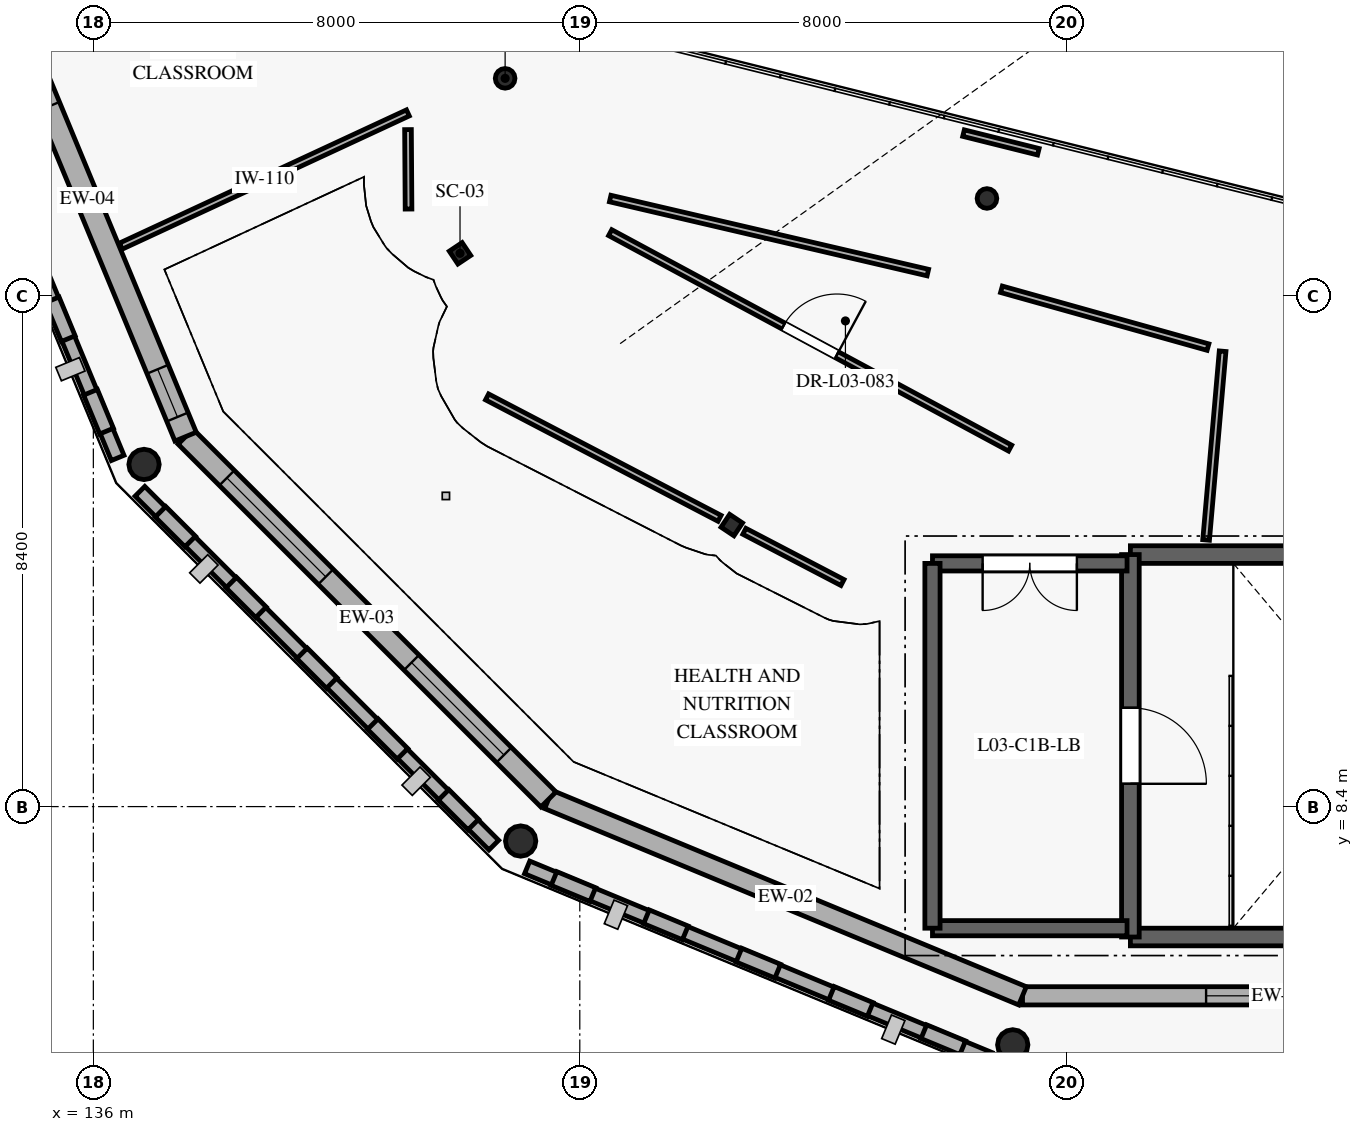
"""IFC4 building model, lengths in metres.
Left out: names, types, materials, properties, quantities, classifications, styles, units other than length and angle.
Written with IfcOpenShell. Run it as: python <this file> out.ifc"""

import sys

from ifc_helpers import new_model, si_unit, direction, frame, frame_2d, origin, origin_2d, place, context, subcontext, project, spatial, rectangle, circle, hollow_circle, i_section, extrude, element, fill, save


model = new_model("IFC4")
c1 = context("Model", 3, precision=1e-05, world=origin(), true_north=direction((0.0, 1.0)))
c2 = subcontext(c1, "Body", "Model", "MODEL_VIEW")
j1 = project(units=[si_unit("LENGTHUNIT", "METRE"), si_unit("PLANEANGLEUNIT", "RADIAN")], contexts=[c1])
p1 = place(None, origin())
s1 = spatial("IfcSite", under=j1, at=p1, CompositionType="ELEMENT")
p2 = place(p1, origin())
s2 = spatial("IfcBuilding", under=s1, at=p2, CompositionType="ELEMENT")
p3 = place(p2, frame((0.0, 0.0, 12.6)))
s3 = spatial("IfcBuildingStorey", under=s2, at=p3, CompositionType="ELEMENT", Elevation=12.6)
for number, where, z_axis, x_axis in (
    (1, (142.772, 20.377, 0.0), (0.0, 0.0, 1.0), (0.97, -0.242, 0.0)),
    (2, (150.696, 18.402, 0.0), (0.0, 0.0, 1.0), (0.97, -0.242, 0.0)),
):
    element("IfcColumn", number, at=place(p3, frame(where, z_axis=z_axis, x_axis=x_axis)), inside=s3, PredefinedType="COLUMN", context=c2, shape_type="SweptSolid", body=[
        extrude(hollow_circle(Radius=0.162, WallThickness=0.016, at=origin_2d()), origin(), (0.0, 0.0, 1.0), 4.2),
    ])
for number, where, z_axis, x_axis in (
    (3, (136.833, 14.027, 0.0), (0.0, 0.0, 1.0), (0.556, -0.831, 0.0)),
    (4, (143.027, 7.833, 0.0), (0.0, 0.0, 1.0), (0.831, -0.556, 0.0)),
    (5, (151.12, 4.481, 0.0), (0.0, 0.0, 1.0), (0.981, -0.195, 0.0)),
):
    element("IfcColumn", number, at=place(p3, frame(where, z_axis=z_axis, x_axis=x_axis)), inside=s3, PredefinedType="COLUMN", context=c2, shape_type="SweptSolid", body=[
        extrude(circle(Radius=0.25, at=origin_2d()), origin(), (0.0, 0.0, 1.0), 4.2),
    ])
for number, where, z_axis, x_axis in (
    (6, (142.03, 17.5, 0.0), (0.0, 0.0, 1.0), (0.556, -0.831, 0.0)),
    (7, (146.5, 13.03, 0.0), (0.0, 0.0, 1.0), (0.831, -0.556, 0.0)),
):
    element("IfcColumn", number, at=place(p3, frame(where, z_axis=z_axis, x_axis=x_axis)), inside=s3, PredefinedType="COLUMN", context=c2, shape_type="SweptSolid", body=[
        extrude(i_section(OverallWidth=0.255, OverallDepth=0.254, WebThickness=0.009, FlangeThickness=0.014, FilletRadius=0.013, at=origin_2d()), origin(), (0.0, 0.0, 1.0), 4.2),
    ])
p4 = place(p3, frame((159.719, 5.288, 0.0), z_axis=(0.0, 0.0, 1.0), x_axis=(-1.0, 0.0, 0.0)))
e8 = element("IfcWall", 8, at=p4, inside=s3, PredefinedType="SOLIDWALL", context=c2, shape_type="SweptSolid", body=[
    extrude(rectangle(XDim=8.438, YDim=0.3, at=frame_2d((4.219, 0.0))), origin(), (0.0, 0.0, 1.0), 3.94),
])
p5 = place(p4, frame((1.185, 0.0, 0.85)))
e9 = element("IfcOpeningElement", 9, at=p5, cuts=e8, PredefinedType="OPENING", context=c2, shape_type="SweptSolid", body=[
    extrude(rectangle(XDim=1.85, YDim=1.4, at=frame_2d((0.925, 0.7))), frame((0.0, 0.16, 0.0), z_axis=(0.0, -1.0, 0.0), x_axis=(1.0, 0.0, 0.0)), (0.0, 0.0, 1.0), 0.32),
])
p6 = place(p4, frame((4.569, 0.0, 0.85)))
e10 = element("IfcOpeningElement", 10, at=p6, cuts=e8, PredefinedType="OPENING", context=c2, shape_type="SweptSolid", body=[
    extrude(rectangle(XDim=0.85, YDim=1.4, at=frame_2d((0.425, 0.7))), frame((0.0, 0.16, 0.0), z_axis=(0.0, -1.0, 0.0), x_axis=(1.0, 0.0, 0.0)), (0.0, 0.0, 1.0), 0.32),
])
p7 = place(p3, frame((151.281, 5.288, 0.0), z_axis=(0.0, 0.0, 1.0), x_axis=(-0.923884604839, 0.382671186453, 0.0)))
e11 = element("IfcWall", 11, at=p7, inside=s3, PredefinedType="SOLIDWALL", context=c2, shape_type="SweptSolid", body=[
    extrude(rectangle(XDim=8.439, YDim=0.325, at=frame_2d((4.219, 0.0))), origin(), (0.0, 0.0, 1.0), 3.94),
])
p8 = place(p3, frame((143.484, 8.517, 0.0), z_axis=(0.0, 0.0, 1.0), x_axis=(-0.707106781187, 0.707106781187, 0.0)))
e12 = element("IfcWall", 12, at=p8, inside=s3, PredefinedType="SOLIDWALL", context=c2, shape_type="SweptSolid", body=[
    extrude(rectangle(XDim=8.439, YDim=0.35, at=frame_2d((4.219, 0.0))), origin(), (0.0, 0.0, 1.0), 3.94),
])
p9 = place(p8, frame((1.035, 0.0, 0.85)))
e13 = element("IfcOpeningElement", 13, at=p9, cuts=e12, PredefinedType="OPENING", context=c2, shape_type="SweptSolid", body=[
    extrude(rectangle(XDim=2.15, YDim=1.4, at=frame_2d((1.075, 0.7))), frame((0.0, 0.185, 0.0), z_axis=(0.0, -1.0, 0.0), x_axis=(1.0, 0.0, 0.0)), (0.0, 0.0, 1.0), 0.37),
])
p10 = place(p8, frame((5.179, 0.0, 0.85)))
e14 = element("IfcOpeningElement", 14, at=p10, cuts=e12, PredefinedType="OPENING", context=c2, shape_type="SweptSolid", body=[
    extrude(rectangle(XDim=2.3, YDim=1.4, at=frame_2d((1.15, 0.7))), frame((0.0, 0.185, 0.0), z_axis=(0.0, -1.0, 0.0), x_axis=(1.0, 0.0, 0.0)), (0.0, 0.0, 1.0), 0.37),
])
p11 = place(p3, frame((137.517, 14.484, 0.0), z_axis=(0.0, 0.0, 1.0), x_axis=(-0.382671186453, 0.923884604839, 0.0)))
e15 = element("IfcWall", 15, at=p11, inside=s3, PredefinedType="SOLIDWALL", context=c2, shape_type="SweptSolid", body=[
    extrude(rectangle(XDim=8.439, YDim=0.38, at=frame_2d((4.219, 0.0))), origin(), (0.0, 0.0, 1.0), 3.94),
])
p12 = place(p11, frame((0.35, 0.0, 0.85)))
e16 = element("IfcOpeningElement", 16, at=p12, cuts=e15, PredefinedType="OPENING", context=c2, shape_type="SweptSolid", body=[
    extrude(rectangle(XDim=0.85, YDim=1.4, at=frame_2d((0.425, 0.7))), frame((0.0, 0.2, 0.0), z_axis=(0.0, -1.0, 0.0), x_axis=(1.0, 0.0, 0.0)), (0.0, 0.0, 1.0), 0.4),
])
p13 = place(p11, frame((5.879, 0.0, 0.85)))
e17 = element("IfcOpeningElement", 17, at=p13, cuts=e15, PredefinedType="OPENING", context=c2, shape_type="SweptSolid", body=[
    extrude(rectangle(XDim=0.9, YDim=1.6, at=frame_2d((0.45, 0.8))), frame((0.0, 0.2, 0.0), z_axis=(0.0, -1.0, 0.0), x_axis=(1.0, 0.0, 0.0)), (0.0, 0.0, 1.0), 0.4),
])
p14 = place(p3, frame((133.251, 21.738, 0.0), z_axis=(0.0, 0.0, 1.0), x_axis=(0.382687155267, -0.923877990426, 0.0)))
e18 = element("IfcWall", 18, at=p14, inside=s3, PredefinedType="ELEMENTEDWALL", context=c2, shape_type="SweptSolid", body=[
    extrude(rectangle(XDim=8.23, YDim=0.225, at=frame_2d((4.115, 0.0))), origin(), (0.0, 0.0, 1.0), 1.09),
])
for number, where, z_axis, x_axis in (
    (19, (135.323, 16.735, 1.09), (0.0, 0.0, 1.0), (0.383, -0.924, 0.0)),
    (20, (135.953, 15.214, 1.09), (0.0, 0.0, 1.0), (0.383, -0.924, 0.0)),
):
    element("IfcWall", number, at=place(p3, frame(where, z_axis=z_axis, x_axis=x_axis)), inside=s3, PredefinedType="ELEMENTEDWALL", context=c2, shape_type="SweptSolid", body=[
        extrude(rectangle(XDim=0.691, YDim=0.245, at=frame_2d((0.345, 0.0))), origin(), (0.0, 0.0, 1.0), 2.85),
    ])
p15 = place(p3, frame((136.767, 13.586, 0.0), z_axis=(0.0, 0.0, 1.0), x_axis=(0.707106781187, -0.707106781187, 0.0)))
e21 = element("IfcWall", 21, at=p15, inside=s3, PredefinedType="ELEMENTEDWALL", context=c2, shape_type="SweptSolid", body=[
    extrude(rectangle(XDim=8.23, YDim=0.225, at=frame_2d((4.115, 0.0))), origin(), (0.0, 0.0, 1.0), 1.09),
])
p16 = place(p3, frame((137.104, 13.248, 1.09), z_axis=(0.0, 0.0, 1.0), x_axis=(0.707283403329, -0.706930114916, 0.0)))
e22 = element("IfcWall", 22, at=p16, inside=s3, PredefinedType="ELEMENTEDWALL", context=c2, shape_type="SweptSolid", body=[
    extrude(rectangle(XDim=0.691, YDim=0.245, at=frame_2d((0.346, 0.0))), origin(), (0.0, 0.0, 1.0), 2.85),
])
p17 = place(p3, frame((138.268, 12.084, 1.09), z_axis=(0.0, 0.0, 1.0), x_axis=(0.707106781187, -0.707106781187, 0.0)))
e23 = element("IfcWall", 23, at=p17, inside=s3, PredefinedType="ELEMENTEDWALL", context=c2, shape_type="SweptSolid", body=[
    extrude(rectangle(XDim=0.691, YDim=0.245, at=frame_2d((0.345, 0.0))), origin(), (0.0, 0.0, 1.0), 2.85),
])
p18 = place(p3, frame((139.432, 10.921, 1.09), z_axis=(0.0, 0.0, 1.0), x_axis=(0.707106781187, -0.707106781187, 0.0)))
e24 = element("IfcWall", 24, at=p18, inside=s3, PredefinedType="ELEMENTEDWALL", context=c2, shape_type="SweptSolid", body=[
    extrude(rectangle(XDim=0.691, YDim=0.245, at=frame_2d((0.346, 0.0))), origin(), (0.0, 0.0, 1.0), 2.85),
])
p19 = place(p3, frame((140.596, 9.757, 1.09), z_axis=(0.0, 0.0, 1.0), x_axis=(0.707106781187, -0.707106781187, 0.0)))
e25 = element("IfcWall", 25, at=p19, inside=s3, PredefinedType="ELEMENTEDWALL", context=c2, shape_type="SweptSolid", body=[
    extrude(rectangle(XDim=0.691, YDim=0.245, at=frame_2d((0.345, 0.0))), origin(), (0.0, 0.0, 1.0), 2.85),
])
p20 = place(p3, frame((141.76, 8.593, 1.09), z_axis=(0.0, 0.0, 1.0), x_axis=(0.706930114916, -0.707283403329, 0.0)))
e26 = element("IfcWall", 26, at=p20, inside=s3, PredefinedType="ELEMENTEDWALL", context=c2, shape_type="SweptSolid", body=[
    extrude(rectangle(XDim=0.691, YDim=0.245, at=frame_2d((0.346, 0.0))), origin(), (0.0, 0.0, 1.0), 2.85),
])
p21 = place(p3, frame((143.135, 7.4, 0.0), z_axis=(0.0, 0.0, 1.0), x_axis=(0.923877990426, -0.382687155267, 0.0)))
e27 = element("IfcWall", 27, at=p21, inside=s3, PredefinedType="ELEMENTEDWALL", context=c2, shape_type="SweptSolid", body=[
    extrude(rectangle(XDim=8.23, YDim=0.225, at=frame_2d((4.115, 0.0))), origin(), (0.0, 0.0, 1.0), 1.09),
])
for number, where, z_axis, x_axis in (
    (28, (143.576, 7.217, 1.09), (0.0, 0.0, 1.0), (0.924, -0.383, 0.0)),
    (29, (145.096, 6.587, 1.09), (0.0, 0.0, 1.0), (0.924, -0.383, 0.0)),
    (30, (146.617, 5.958, 1.09), (0.0, 0.0, 1.0), (0.924, -0.383, 0.0)),
):
    element("IfcWall", number, at=place(p3, frame(where, z_axis=z_axis, x_axis=x_axis)), inside=s3, PredefinedType="ELEMENTEDWALL", context=c2, shape_type="SweptSolid", body=[
        extrude(rectangle(XDim=0.691, YDim=0.245, at=frame_2d((0.345, 0.0))), origin(), (0.0, 0.0, 1.0), 2.85),
    ])
p22 = place(p3, frame((148.138, 5.328, 1.09), z_axis=(0.0, 0.0, 1.0), x_axis=(0.923848822335, -0.382757564877, 0.0)))
e31 = element("IfcWall", 31, at=p22, inside=s3, PredefinedType="ELEMENTEDWALL", context=c2, shape_type="SweptSolid", body=[
    extrude(rectangle(XDim=0.691, YDim=0.245, at=frame_2d((0.345, 0.0))), origin(), (0.0, 0.0, 1.0), 2.85),
])
p23 = place(p3, frame((149.658, 4.698, 1.09), z_axis=(0.0, 0.0, 1.0), x_axis=(0.92377564286, -0.382934147939, 0.0)))
e32 = element("IfcWall", 32, at=p23, inside=s3, PredefinedType="ELEMENTEDWALL", context=c2, shape_type="SweptSolid", body=[
    extrude(rectangle(XDim=0.691, YDim=0.245, at=frame_2d((0.346, 0.0))), origin(), (0.0, 0.0, 1.0), 2.85),
])
for number, where, z_axis, x_axis in (
    (33, (153.055, 6.255, 0.0), (0.0, 0.0, 1.0), (1.0, 0.0, 0.0)),
    (34, (159.945, 12.545, 0.0), (0.0, 0.0, 1.0), (-1.0, 0.0, 0.0)),
):
    element("IfcWall", number, at=place(p3, frame(where, z_axis=z_axis, x_axis=x_axis)), inside=s3, PredefinedType="SHEAR", context=c2, shape_type="SweptSolid", body=[
        extrude(rectangle(XDim=6.89, YDim=0.29, at=frame_2d((3.445, 0.0))), origin(), (0.0, 0.0, 1.0), 3.95),
    ])
p24 = place(p3, frame((153.055, 12.545, 0.0), z_axis=(0.0, 0.0, 1.0), x_axis=(0.0, -1.0, 0.0)))
e35 = element("IfcWall", 35, at=p24, inside=s3, PredefinedType="SHEAR", context=c2, shape_type="SweptSolid", body=[
    extrude(rectangle(XDim=6.29, YDim=0.29, at=frame_2d((3.145, 0.0))), origin(), (0.0, 0.0, 1.0), 3.95),
])
p25 = place(p24, frame((2.52, 0.0, 0.0)))
e36 = element("IfcOpeningElement", 36, at=p25, cuts=e35, PredefinedType="OPENING", context=c2, shape_type="SweptSolid", body=[
    extrude(rectangle(XDim=1.25, YDim=2.1, at=frame_2d((0.625, 1.05))), frame((0.0, 0.155, 0.0), z_axis=(0.0, -1.0, 0.0), x_axis=(1.0, 0.0, 0.0)), (0.0, 0.0, 1.0), 0.31),
])
p26 = place(p3, frame((149.8, 6.4, 0.0), z_axis=(0.0, 0.0, 1.0), x_axis=(1.0, 0.0, 0.0)))
e37 = element("IfcWall", 37, at=p26, inside=s3, PredefinedType="SHEAR", context=c2, shape_type="SweptSolid", body=[
    extrude(rectangle(XDim=3.2, YDim=0.25, at=frame_2d((1.6, 0.0))), origin(), (0.0, 0.0, 1.0), 3.95),
])
p27 = place(p3, frame((153.0, 12.4, 0.0), z_axis=(0.0, 0.0, 1.0), x_axis=(-1.0, 0.0, 0.0)))
e38 = element("IfcWall", 38, at=p27, inside=s3, PredefinedType="SHEAR", context=c2, shape_type="SweptSolid", body=[
    extrude(rectangle(XDim=3.2, YDim=0.25, at=frame_2d((1.6, 0.0))), origin(), (0.0, 0.0, 1.0), 3.95),
])
p28 = place(p27, frame((0.825, 0.0, 0.0)))
e39 = element("IfcOpeningElement", 39, at=p28, cuts=e38, PredefinedType="OPENING", context=c2, shape_type="SweptSolid", body=[
    extrude(rectangle(XDim=1.55, YDim=2.15, at=frame_2d((0.775, 1.075))), frame((0.0, 0.135, 0.0), z_axis=(0.0, -1.0, 0.0), x_axis=(1.0, 0.0, 0.0)), (0.0, 0.0, 1.0), 0.27),
])
p29 = place(p3, frame((149.8, 12.4, 0.0), z_axis=(0.0, 0.0, 1.0), x_axis=(0.0, -1.0, 0.0)))
e40 = element("IfcWall", 40, at=p29, inside=s3, PredefinedType="SHEAR", context=c2, shape_type="SweptSolid", body=[
    extrude(rectangle(XDim=6.0, YDim=0.25, at=frame_2d((3.0, 0.0))), origin(), (0.0, 0.0, 1.0), 3.95),
])
p30 = place(p3, frame((141.173, 19.809, 0.0), z_axis=(0.0, 0.0, 1.0), x_axis=(-0.90703456181, -0.421056176397, 0.0)))
e41 = element("IfcWall", 41, at=p30, inside=s3, PredefinedType="PARTITIONING", context=c2, shape_type="SweptSolid", body=[
    extrude(rectangle(XDim=5.205, YDim=0.11, at=frame_2d((2.602, 0.0))), origin(), (0.0, 0.0, 1.0), 3.95),
])
p31 = place(p3, frame((154.3, 12.785, 0.0), z_axis=(0.0, 0.0, 1.0), x_axis=(0.08719416146, 0.996191336143, 0.0)))
e42 = element("IfcWall", 42, at=p31, inside=s3, PredefinedType="PARTITIONING", context=c2, shape_type="SweptSolid", body=[
    extrude(rectangle(XDim=3.116, YDim=0.11, at=frame_2d((1.558, 0.0))), origin(), (0.0, 0.0, 1.0), 3.95),
])
p32 = place(p3, frame((154.331, 15.957, 0.0), z_axis=(0.0, 0.0, 1.0), x_axis=(-0.96293957609, 0.269717208943, 0.0)))
e43 = element("IfcWall", 43, at=p32, inside=s3, PredefinedType="PARTITIONING", context=c2, shape_type="SweptSolid", body=[
    extrude(rectangle(XDim=3.527, YDim=0.11, at=frame_2d((1.764, 0.0))), origin(), (0.0, 0.0, 1.0), 3.95),
])
p33 = place(p3, frame((151.541, 19.17, 0.0), z_axis=(0.0, 0.0, 1.0), x_axis=(-0.970278241174, 0.241992013721, 0.0)))
e44 = element("IfcWall", 44, at=p33, inside=s3, PredefinedType="PARTITIONING", context=c2, shape_type="SweptSolid", body=[
    extrude(rectangle(XDim=1.268, YDim=0.11, at=frame_2d((0.634, 0.0))), origin(), (0.0, 0.0, 1.0), 3.95),
])
p34 = place(p3, frame((149.724, 17.183, 0.0), z_axis=(0.0, 0.0, 1.0), x_axis=(-0.973885509314, 0.227039676596, 0.0)))
e45 = element("IfcWall", 45, at=p34, inside=s3, PredefinedType="PARTITIONING", context=c2, shape_type="SweptSolid", body=[
    extrude(rectangle(XDim=5.364, YDim=0.11, at=frame_2d((2.682, 0.0))), origin(), (0.0, 0.0, 1.0), 3.95),
])
p35 = place(p3, frame((144.5, 17.84, 0.0), z_axis=(0.0, 0.0, 1.0), x_axis=(0.880350401945, -0.474323908101, 0.0)))
e46 = element("IfcWall", 46, at=p35, inside=s3, PredefinedType="PARTITIONING", context=c2, shape_type="SweptSolid", body=[
    extrude(rectangle(XDim=7.471, YDim=0.11, at=frame_2d((3.735, 0.0))), origin(), (0.0, 0.0, 1.0), 3.95),
])
p36 = place(p35, frame((3.236, 0.0, 0.0)))
e47 = element("IfcOpeningElement", 47, at=p36, cuts=e46, PredefinedType="OPENING", context=c2, shape_type="SweptSolid", body=[
    extrude(rectangle(XDim=1.0, YDim=2.1, at=frame_2d((0.5, 1.05))), frame((0.0, 0.065, 0.0), z_axis=(0.0, -1.0, 0.0), x_axis=(1.0, 0.0, 0.0)), (0.0, 0.0, 1.0), 0.13),
])
p37 = place(p3, frame((148.32, 12.085, 0.0), z_axis=(0.0, 0.0, 1.0), x_axis=(-0.886374313461, 0.46296930399, 0.0)))
e48 = element("IfcWall", 48, at=p37, inside=s3, PredefinedType="PARTITIONING", context=c2, shape_type="SweptSolid", body=[
    extrude(rectangle(XDim=1.82, YDim=0.11, at=frame_2d((0.91, 0.0))), origin(), (0.0, 0.0, 1.0), 3.95),
])
p38 = place(p3, frame((146.299, 13.141, 0.0), z_axis=(0.0, 0.0, 1.0), x_axis=(-0.886374847625, 0.462968281309, 0.0)))
e49 = element("IfcWall", 49, at=p38, inside=s3, PredefinedType="PARTITIONING", context=c2, shape_type="SweptSolid", body=[
    extrude(rectangle(XDim=4.314, YDim=0.11, at=frame_2d((2.157, 0.0))), origin(), (0.0, 0.0, 1.0), 3.424),
])
p39 = place(p3, frame((141.184, 18.228, 0.0), z_axis=(0.0, 0.0, 1.0), x_axis=(-0.006727562196, 0.999977369697, 0.0)))
e50 = element("IfcWall", 50, at=p39, inside=s3, PredefinedType="PARTITIONING", context=c2, shape_type="SweptSolid", body=[
    extrude(rectangle(XDim=1.306, YDim=0.11, at=frame_2d((0.653, 0.0))), origin(), (0.0, 0.0, 1.0), 3.95),
])
p40 = place(p6, origin())
e51 = element("IfcWindow", 51, at=p40, inside=s3, PartitioningType="SINGLE_PANEL", PredefinedType="WINDOW", context=c2, shape_type="SweptSolid", body=[
    extrude(rectangle(XDim=0.85, YDim=1.4, at=frame_2d((0.425, 0.7))), frame((0.0, 0.03, 0.0), z_axis=(0.0, -1.0, 0.0), x_axis=(1.0, 0.0, 0.0)), (0.0, 0.0, 1.0), 0.06),
])
fill(e10, e51)
p41 = place(p9, origin())
e52 = element("IfcWindow", 52, at=p41, inside=s3, PartitioningType="SINGLE_PANEL", PredefinedType="WINDOW", context=c2, shape_type="SweptSolid", body=[
    extrude(rectangle(XDim=2.15, YDim=1.4, at=frame_2d((1.075, 0.7))), frame((0.0, 0.03, 0.0), z_axis=(0.0, -1.0, 0.0), x_axis=(1.0, 0.0, 0.0)), (0.0, 0.0, 1.0), 0.06),
])
fill(e13, e52)
p42 = place(p10, origin())
e53 = element("IfcWindow", 53, at=p42, inside=s3, PartitioningType="SINGLE_PANEL", PredefinedType="WINDOW", context=c2, shape_type="SweptSolid", body=[
    extrude(rectangle(XDim=2.3, YDim=1.4, at=frame_2d((1.15, 0.7))), frame((0.0, 0.03, 0.0), z_axis=(0.0, -1.0, 0.0), x_axis=(1.0, 0.0, 0.0)), (0.0, 0.0, 1.0), 0.06),
])
fill(e14, e53)
p43 = place(p12, origin())
e54 = element("IfcWindow", 54, at=p43, inside=s3, PartitioningType="SINGLE_PANEL", PredefinedType="WINDOW", context=c2, shape_type="SweptSolid", body=[
    extrude(rectangle(XDim=0.85, YDim=1.4, at=frame_2d((0.425, 0.7))), frame((0.0, 0.03, 0.0), z_axis=(0.0, -1.0, 0.0), x_axis=(1.0, 0.0, 0.0)), (0.0, 0.0, 1.0), 0.06),
])
fill(e16, e54)
p44 = place(p25, origin())
e55 = element("IfcDoor", 55, at=p44, inside=s3, OperationType="SINGLE_SWING_RIGHT", PredefinedType="DOOR", context=c2, shape_type="SweptSolid", body=[
    extrude(rectangle(XDim=1.25, YDim=2.1, at=frame_2d((0.625, 1.05))), frame((0.0, 0.025, 0.0), z_axis=(0.0, -1.0, 0.0), x_axis=(1.0, 0.0, 0.0)), (0.0, 0.0, 1.0), 0.05),
])
fill(e36, e55)
p45 = place(p28, origin())
e56 = element("IfcDoor", 56, at=p45, inside=s3, OperationType="DOUBLE_DOOR_SINGLE_SWING", PredefinedType="DOOR", context=c2, shape_type="SweptSolid", body=[
    extrude(rectangle(XDim=1.55, YDim=2.15, at=frame_2d((0.775, 1.075))), frame((0.0, 0.025, 0.0), z_axis=(0.0, -1.0, 0.0), x_axis=(1.0, 0.0, 0.0)), (0.0, 0.0, 1.0), 0.05),
])
fill(e39, e56)
p46 = place(p36, origin())
e57 = element("IfcDoor", 57, at=p46, inside=s3, OperationType="SINGLE_SWING_RIGHT", PredefinedType="DOOR", context=c2, shape_type="SweptSolid", body=[
    extrude(rectangle(XDim=1.0, YDim=2.1, at=frame_2d((0.5, 1.05))), frame((0.0, 0.025, 0.0), z_axis=(0.0, -1.0, 0.0), x_axis=(1.0, 0.0, 0.0)), (0.0, 0.0, 1.0), 0.05),
])
fill(e47, e57)
save(model, sys.argv[1])
